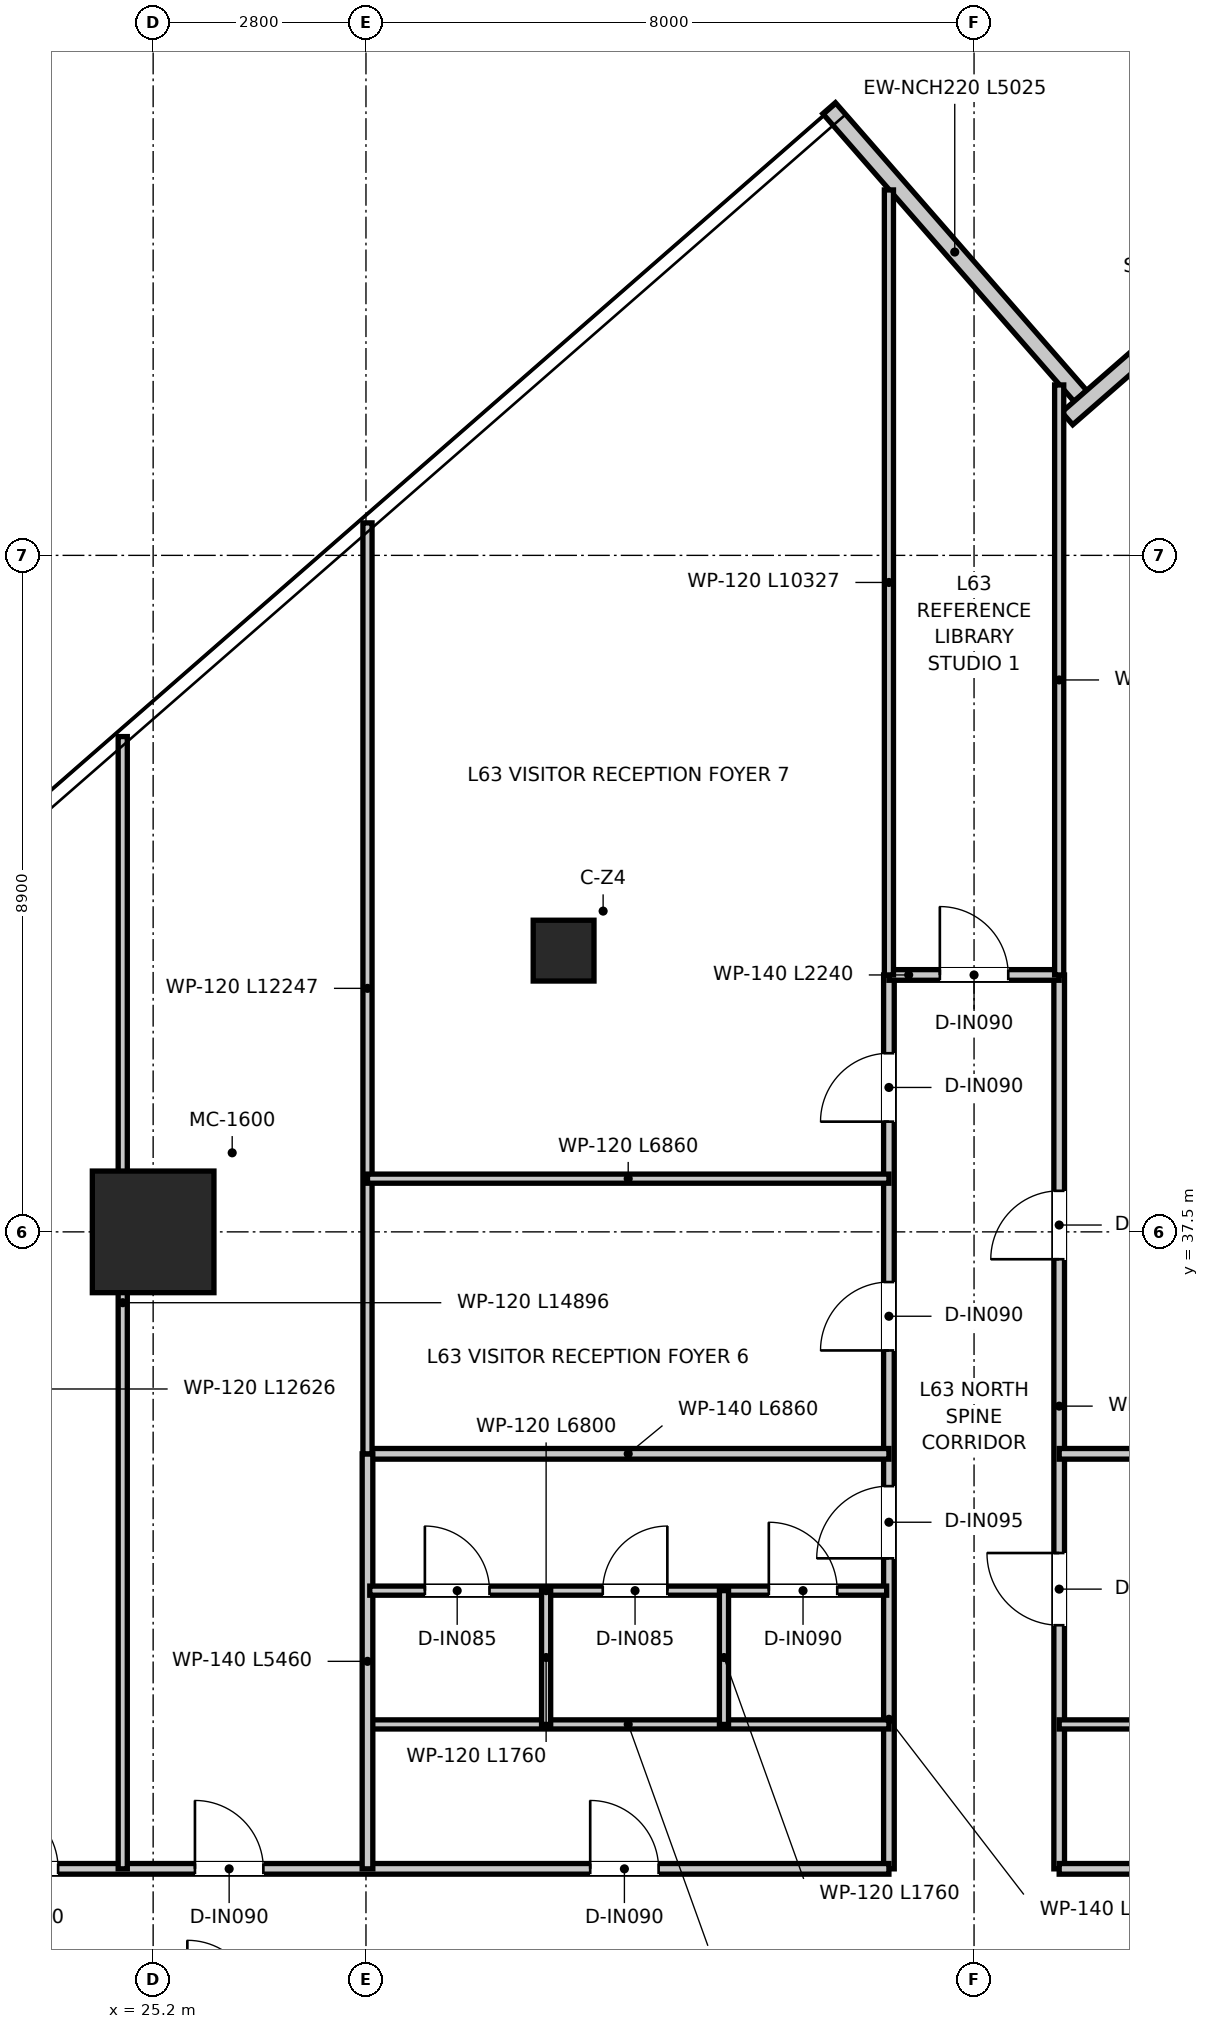
"""IFC4 building model, lengths in metres.
Left out: names, types, materials, properties, quantities, classifications, styles, units other than length and angle.
Written with IfcOpenShell. Run it as: python <this file> out.ifc"""

import sys

from ifc_helpers import new_model, si_unit, direction, frame, frame_2d, origin, origin_2d, place, context, subcontext, project, spatial, rectangle, extrude, source, transform, mapped, element, fill, save


model = new_model("IFC4")
c1 = context("Model", 3, precision=1e-05, world=origin(), true_north=direction((0.0, 1.0)))
c2 = subcontext(c1, "Body", "Model", "MODEL_VIEW")
j1 = project(units=[si_unit("LENGTHUNIT", "METRE"), si_unit("PLANEANGLEUNIT", "RADIAN")], contexts=[c1])
p1 = place(None, origin())
s1 = spatial("IfcSite", under=j1, at=p1, CompositionType="ELEMENT")
p2 = place(p1, origin())
s2 = spatial("IfcBuilding", under=s1, at=p2, CompositionType="ELEMENT")
p3 = place(p2, frame((0.0, 0.0, 258.65)))
s3 = spatial("IfcBuildingStorey", under=s2, at=p3, CompositionType="ELEMENT", Elevation=258.65)
m1 = source(origin(), c2, "Body", "SweptSolid", [
    extrude(rectangle(XDim=1.6, YDim=1.6, at=origin_2d()), origin(), (0.0, 0.0, 1.0), 3.95),
])
p4 = place(p3, frame((25.2, 37.5, 0.0), z_axis=(0.0, 0.0, 1.0), x_axis=(1.0, 0.0, 0.0)))
e1 = element("IfcColumn", 1, at=p4, inside=s3, PredefinedType="USERDEFINED", context=c2, shape_type="MappedRepresentation", body=[
    mapped(m1, transform((0.0, 0.0, 0.0), x_axis=(1.0, 0.0, 0.0), y_axis=(0.0, 1.0, 0.0), z_axis=(0.0, 0.0, 1.0), scale=1.0)),
])
m2 = source(origin(), c2, "Body", "SweptSolid", [
    extrude(rectangle(XDim=0.8, YDim=0.8, at=origin_2d()), origin(), (0.0, 0.0, 1.0), 3.95),
])
p5 = place(p3, frame((30.6, 41.2, 0.0), z_axis=(0.0, 0.0, 1.0), x_axis=(1.0, 0.0, 0.0)))
e2 = element("IfcColumn", 2, at=p5, inside=s3, PredefinedType="COLUMN", context=c2, shape_type="MappedRepresentation", body=[
    mapped(m2, transform((0.0, 0.0, 0.0), x_axis=(1.0, 0.0, 0.0), y_axis=(0.0, 1.0, 0.0), z_axis=(0.0, 0.0, 1.0), scale=1.0)),
])
p6 = place(p3, frame((37.398, 48.498, 0.0), z_axis=(0.0, 0.0, 1.0), x_axis=(-0.657706226339, 0.753274531518, 0.0)))
e3 = element("IfcWall", 3, at=p6, inside=s3, PredefinedType="ELEMENTEDWALL", context=c2, shape_type="SweptSolid", body=[
    extrude(rectangle(XDim=5.025, YDim=0.22, at=frame_2d((2.512, 0.0))), origin(), (0.0, 0.0, 1.0), 3.6),
])
p7 = place(p3, frame((41.339, 51.792, 0.0), z_axis=(0.0, 0.0, 1.0), x_axis=(-0.753268767402, -0.657712827955, 0.0)))
e4 = element("IfcWall", 4, at=p7, inside=s3, PredefinedType="ELEMENTEDWALL", context=c2, shape_type="SweptSolid", body=[
    extrude(rectangle(XDim=5.46, YDim=0.22, at=frame_2d((2.73, 0.0))), origin(), (0.0, 0.0, 1.0), 3.6),
])
p8 = place(p3, frame((34.88, 29.12, 0.0), z_axis=(0.0, 0.0, 1.0), x_axis=(0.0, 1.0, 0.0)))
e5 = element("IfcWall", 5, at=p8, inside=s3, PredefinedType="PARTITIONING", context=c2, shape_type="SweptSolid", body=[
    extrude(rectangle(XDim=11.76, YDim=0.14, at=frame_2d((5.88, 0.0))), origin(), (0.0, 0.0, 1.0), 2.96),
])
p9 = place(p8, frame((4.085, 0.0, 0.0)))
e6 = element("IfcOpeningElement", 6, at=p9, cuts=e5, PredefinedType="OPENING", context=c2, shape_type="SweptSolid", body=[
    extrude(rectangle(XDim=0.95, YDim=2.1, at=frame_2d((0.475, 1.05))), frame((0.0, 0.08, 0.0), z_axis=(0.0, -1.0, 0.0), x_axis=(1.0, 0.0, 0.0)), (0.0, 0.0, 1.0), 0.16),
])
p10 = place(p8, frame((6.82, 0.0, 0.0)))
e7 = element("IfcOpeningElement", 7, at=p10, cuts=e5, PredefinedType="OPENING", context=c2, shape_type="SweptSolid", body=[
    extrude(rectangle(XDim=0.9, YDim=2.1, at=frame_2d((0.45, 1.05))), frame((0.0, 0.08, 0.0), z_axis=(0.0, -1.0, 0.0), x_axis=(1.0, 0.0, 0.0)), (0.0, 0.0, 1.0), 0.16),
])
p11 = place(p8, frame((9.83, 0.0, 0.0)))
e8 = element("IfcOpeningElement", 8, at=p11, cuts=e5, PredefinedType="OPENING", context=c2, shape_type="SweptSolid", body=[
    extrude(rectangle(XDim=0.9, YDim=2.1, at=frame_2d((0.45, 1.05))), frame((0.0, 0.08, 0.0), z_axis=(0.0, -1.0, 0.0), x_axis=(1.0, 0.0, 0.0)), (0.0, 0.0, 1.0), 0.16),
])
p12 = place(p3, frame((37.12, 29.12, 0.0), z_axis=(0.0, 0.0, 1.0), x_axis=(0.0, 1.0, 0.0)))
e9 = element("IfcWall", 9, at=p12, inside=s3, PredefinedType="PARTITIONING", context=c2, shape_type="SweptSolid", body=[
    extrude(rectangle(XDim=11.76, YDim=0.14, at=frame_2d((5.88, 0.0))), origin(), (0.0, 0.0, 1.0), 2.96),
])
p13 = place(p12, frame((3.205, 0.0, 0.0)))
e10 = element("IfcOpeningElement", 10, at=p13, cuts=e9, PredefinedType="OPENING", context=c2, shape_type="SweptSolid", body=[
    extrude(rectangle(XDim=0.95, YDim=2.1, at=frame_2d((0.475, 1.05))), frame((0.0, 0.08, 0.0), z_axis=(0.0, -1.0, 0.0), x_axis=(1.0, 0.0, 0.0)), (0.0, 0.0, 1.0), 0.16),
])
p14 = place(p12, frame((8.02, 0.0, 0.0)))
e11 = element("IfcOpeningElement", 11, at=p14, cuts=e9, PredefinedType="OPENING", context=c2, shape_type="SweptSolid", body=[
    extrude(rectangle(XDim=0.9, YDim=2.1, at=frame_2d((0.45, 1.05))), frame((0.0, 0.08, 0.0), z_axis=(0.0, -1.0, 0.0), x_axis=(1.0, 0.0, 0.0)), (0.0, 0.0, 1.0), 0.16),
])
p15 = place(p3, frame((34.88, 40.88, 0.0), z_axis=(0.0, 0.0, 1.0), x_axis=(1.0, 0.0, 0.0)))
e12 = element("IfcWall", 12, at=p15, inside=s3, PredefinedType="PARTITIONING", context=c2, shape_type="SweptSolid", body=[
    extrude(rectangle(XDim=2.24, YDim=0.14, at=frame_2d((1.12, 0.0))), origin(), (0.0, 0.0, 1.0), 3.6),
])
p16 = place(p15, frame((0.67, 0.0, 0.0)))
e13 = element("IfcOpeningElement", 13, at=p16, cuts=e12, PredefinedType="OPENING", context=c2, shape_type="SweptSolid", body=[
    extrude(rectangle(XDim=0.9, YDim=2.1, at=frame_2d((0.45, 1.05))), frame((0.0, 0.08, 0.0), z_axis=(0.0, -1.0, 0.0), x_axis=(1.0, 0.0, 0.0)), (0.0, 0.0, 1.0), 0.16),
])
p17 = place(p3, frame((13.609, 29.12, 0.0), z_axis=(0.0, 0.0, 1.0), x_axis=(1.0, 0.0, 0.0)))
e14 = element("IfcWall", 14, at=p17, inside=s3, PredefinedType="PARTITIONING", context=c2, shape_type="SweptSolid", body=[
    extrude(rectangle(XDim=21.271, YDim=0.14, at=frame_2d((10.635, 0.0))), origin(), (0.0, 0.0, 1.0), 2.96),
])
p18 = place(p17, frame((17.341, 0.0, 0.0)))
e15 = element("IfcOpeningElement", 15, at=p18, cuts=e14, PredefinedType="OPENING", context=c2, shape_type="SweptSolid", body=[
    extrude(rectangle(XDim=0.9, YDim=2.1, at=frame_2d((0.45, 1.05))), frame((0.0, 0.08, 0.0), z_axis=(0.0, -1.0, 0.0), x_axis=(1.0, 0.0, 0.0)), (0.0, 0.0, 1.0), 0.16),
])
p19 = place(p17, frame((1.478, 0.0, 0.0)))
e16 = element("IfcOpeningElement", 16, at=p19, cuts=e14, PredefinedType="OPENING", context=c2, shape_type="SweptSolid", body=[
    extrude(rectangle(XDim=0.9, YDim=2.1, at=frame_2d((0.45, 1.05))), frame((0.0, 0.08, 0.0), z_axis=(0.0, -1.0, 0.0), x_axis=(1.0, 0.0, 0.0)), (0.0, 0.0, 1.0), 0.16),
])
p20 = place(p17, frame((6.841, 0.0, 0.0)))
e17 = element("IfcOpeningElement", 17, at=p20, cuts=e14, PredefinedType="OPENING", context=c2, shape_type="SweptSolid", body=[
    extrude(rectangle(XDim=0.9, YDim=2.1, at=frame_2d((0.45, 1.05))), frame((0.0, 0.08, 0.0), z_axis=(0.0, -1.0, 0.0), x_axis=(1.0, 0.0, 0.0)), (0.0, 0.0, 1.0), 0.16),
])
p21 = place(p17, frame((9.441, 0.0, 0.0)))
e18 = element("IfcOpeningElement", 18, at=p21, cuts=e14, PredefinedType="OPENING", context=c2, shape_type="SweptSolid", body=[
    extrude(rectangle(XDim=0.9, YDim=2.1, at=frame_2d((0.45, 1.05))), frame((0.0, 0.08, 0.0), z_axis=(0.0, -1.0, 0.0), x_axis=(1.0, 0.0, 0.0)), (0.0, 0.0, 1.0), 0.16),
])
p22 = place(p17, frame((12.141, 0.0, 0.0)))
e19 = element("IfcOpeningElement", 19, at=p22, cuts=e14, PredefinedType="OPENING", context=c2, shape_type="SweptSolid", body=[
    extrude(rectangle(XDim=0.9, YDim=2.1, at=frame_2d((0.45, 1.05))), frame((0.0, 0.08, 0.0), z_axis=(0.0, -1.0, 0.0), x_axis=(1.0, 0.0, 0.0)), (0.0, 0.0, 1.0), 0.16),
])
p23 = place(p3, frame((37.12, 29.12, 0.0), z_axis=(0.0, 0.0, 1.0), x_axis=(1.0, 0.0, 0.0)))
e20 = element("IfcWall", 20, at=p23, inside=s3, PredefinedType="PARTITIONING", context=c2, shape_type="SweptSolid", body=[
    extrude(rectangle(XDim=23.862, YDim=0.14, at=frame_2d((11.931, 0.0))), origin(), (0.0, 0.0, 1.0), 2.96),
])
p24 = place(p23, frame((3.03, 0.0, 0.0)))
e21 = element("IfcOpeningElement", 21, at=p24, cuts=e20, PredefinedType="OPENING", context=c2, shape_type="SweptSolid", body=[
    extrude(rectangle(XDim=0.9, YDim=2.1, at=frame_2d((0.45, 1.05))), frame((0.0, 0.08, 0.0), z_axis=(0.0, -1.0, 0.0), x_axis=(1.0, 0.0, 0.0)), (0.0, 0.0, 1.0), 0.16),
])
p25 = place(p23, frame((8.42, 0.0, 0.0)))
e22 = element("IfcOpeningElement", 22, at=p25, cuts=e20, PredefinedType="OPENING", context=c2, shape_type="SweptSolid", body=[
    extrude(rectangle(XDim=0.9, YDim=2.1, at=frame_2d((0.45, 1.05))), frame((0.0, 0.08, 0.0), z_axis=(0.0, -1.0, 0.0), x_axis=(1.0, 0.0, 0.0)), (0.0, 0.0, 1.0), 0.16),
])
p26 = place(p23, frame((12.03, 0.0, 0.0)))
e23 = element("IfcOpeningElement", 23, at=p26, cuts=e20, PredefinedType="OPENING", context=c2, shape_type="SweptSolid", body=[
    extrude(rectangle(XDim=0.9, YDim=2.1, at=frame_2d((0.45, 1.05))), frame((0.0, 0.08, 0.0), z_axis=(0.0, -1.0, 0.0), x_axis=(1.0, 0.0, 0.0)), (0.0, 0.0, 1.0), 0.16),
])
p27 = place(p23, frame((18.293, 0.0, 0.0)))
e24 = element("IfcOpeningElement", 24, at=p27, cuts=e20, PredefinedType="OPENING", context=c2, shape_type="SweptSolid", body=[
    extrude(rectangle(XDim=0.9, YDim=2.1, at=frame_2d((0.45, 1.05))), frame((0.0, 0.08, 0.0), z_axis=(0.0, -1.0, 0.0), x_axis=(1.0, 0.0, 0.0)), (0.0, 0.0, 1.0), 0.16),
])
for number, where, z_axis, x_axis in (
    (25, (28.02, 31.02, 0.0), (0.0, 0.0, 1.0), (1.0, 0.0, 0.0)),
    (26, (37.12, 31.02, 0.0), (0.0, 0.0, 1.0), (1.0, 0.0, 0.0)),
):
    element("IfcWall", number, at=place(p3, frame(where, z_axis=z_axis, x_axis=x_axis)), inside=s3, PredefinedType="PARTITIONING", context=c2, shape_type="SweptSolid", body=[
        extrude(rectangle(XDim=6.86, YDim=0.12, at=frame_2d((3.43, 0.0))), origin(), (0.0, 0.0, 1.0), 3.11),
    ])
for number, where, z_axis, x_axis in (
    (27, (28.02, 34.58, 0.0), (0.0, 0.0, 1.0), (1.0, 0.0, 0.0)),
    (28, (37.12, 34.58, 0.0), (0.0, 0.0, 1.0), (1.0, 0.0, 0.0)),
):
    element("IfcWall", number, at=place(p3, frame(where, z_axis=z_axis, x_axis=x_axis)), inside=s3, PredefinedType="PARTITIONING", context=c2, shape_type="SweptSolid", body=[
        extrude(rectangle(XDim=6.86, YDim=0.14, at=frame_2d((3.43, 0.0))), origin(), (0.0, 0.0, 1.0), 3.11),
    ])
p28 = place(p3, frame((28.02, 29.12, 0.0), z_axis=(0.0, 0.0, 1.0), x_axis=(0.0, 1.0, 0.0)))
e29 = element("IfcWall", 29, at=p28, inside=s3, PredefinedType="PARTITIONING", context=c2, shape_type="SweptSolid", body=[
    extrude(rectangle(XDim=5.46, YDim=0.14, at=frame_2d((2.73, 0.0))), origin(), (0.0, 0.0, 1.0), 3.3),
])
p29 = place(p3, frame((28.05, 32.78, 0.0), z_axis=(0.0, 0.0, 1.0), x_axis=(1.0, 0.0, 0.0)))
e30 = element("IfcWall", 30, at=p29, inside=s3, PredefinedType="PARTITIONING", context=c2, shape_type="SweptSolid", body=[
    extrude(rectangle(XDim=6.8, YDim=0.12, at=frame_2d((3.4, 0.0))), origin(), (0.0, 0.0, 1.0), 3.11),
])
p30 = place(p29, frame((0.725, 0.0, 0.0)))
e31 = element("IfcOpeningElement", 31, at=p30, cuts=e30, PredefinedType="OPENING", context=c2, shape_type="SweptSolid", body=[
    extrude(rectangle(XDim=0.85, YDim=2.1, at=frame_2d((0.425, 1.05))), frame((0.0, 0.07, 0.0), z_axis=(0.0, -1.0, 0.0), x_axis=(1.0, 0.0, 0.0)), (0.0, 0.0, 1.0), 0.14),
])
p31 = place(p29, frame((3.065, 0.0, 0.0)))
e32 = element("IfcOpeningElement", 32, at=p31, cuts=e30, PredefinedType="OPENING", context=c2, shape_type="SweptSolid", body=[
    extrude(rectangle(XDim=0.85, YDim=2.1, at=frame_2d((0.425, 1.05))), frame((0.0, 0.07, 0.0), z_axis=(0.0, -1.0, 0.0), x_axis=(1.0, 0.0, 0.0)), (0.0, 0.0, 1.0), 0.14),
])
p32 = place(p29, frame((5.25, 0.0, 0.0)))
e33 = element("IfcOpeningElement", 33, at=p32, cuts=e30, PredefinedType="OPENING", context=c2, shape_type="SweptSolid", body=[
    extrude(rectangle(XDim=0.9, YDim=2.1, at=frame_2d((0.45, 1.05))), frame((0.0, 0.07, 0.0), z_axis=(0.0, -1.0, 0.0), x_axis=(1.0, 0.0, 0.0)), (0.0, 0.0, 1.0), 0.14),
])
p33 = place(p3, frame((30.37, 31.02, 0.0), z_axis=(0.0, 0.0, 1.0), x_axis=(0.0, 1.0, 0.0)))
e34 = element("IfcWall", 34, at=p33, inside=s3, PredefinedType="PARTITIONING", context=c2, shape_type="SweptSolid", body=[
    extrude(rectangle(XDim=1.76, YDim=0.12, at=frame_2d((0.88, 0.0))), origin(), (0.0, 0.0, 1.0), 3.11),
])
p34 = place(p3, frame((32.71, 31.02, 0.0), z_axis=(0.0, 0.0, 1.0), x_axis=(0.0, 1.0, 0.0)))
e35 = element("IfcWall", 35, at=p34, inside=s3, PredefinedType="PARTITIONING", context=c2, shape_type="SweptSolid", body=[
    extrude(rectangle(XDim=1.76, YDim=0.12, at=frame_2d((0.88, 0.0))), origin(), (0.0, 0.0, 1.0), 3.6),
])
p35 = place(p3, frame((34.88, 40.88, 0.0), z_axis=(0.0, 0.0, 1.0), x_axis=(0.0, 1.0, 0.0)))
e36 = element("IfcWall", 36, at=p35, inside=s3, PredefinedType="PARTITIONING", context=c2, shape_type="SweptSolid", body=[
    extrude(rectangle(XDim=10.328, YDim=0.12, at=frame_2d((5.164, 0.0))), origin(), (0.0, 0.0, 1.0), 3.21),
])
p36 = place(p3, frame((37.12, 40.88, 0.0), z_axis=(0.0, 0.0, 1.0), x_axis=(0.0, 1.0, 0.0)))
e37 = element("IfcWall", 37, at=p36, inside=s3, PredefinedType="PARTITIONING", context=c2, shape_type="SweptSolid", body=[
    extrude(rectangle(XDim=7.762, YDim=0.12, at=frame_2d((3.881, 0.0))), origin(), (0.0, 0.0, 1.0), 3.21),
])
p37 = place(p3, frame((24.8, 29.12, 0.0), z_axis=(0.0, 0.0, 1.0), x_axis=(0.0, 1.0, 0.0)))
e38 = element("IfcWall", 38, at=p37, inside=s3, PredefinedType="PARTITIONING", context=c2, shape_type="SweptSolid", body=[
    extrude(rectangle(XDim=14.896, YDim=0.12, at=frame_2d((7.448, 0.0))), origin(), (0.0, 0.0, 1.0), 3.11),
])
p38 = place(p3, frame((28.02, 34.58, 0.0), z_axis=(0.0, 0.0, 1.0), x_axis=(0.0, 1.0, 0.0)))
e39 = element("IfcWall", 39, at=p38, inside=s3, PredefinedType="PARTITIONING", context=c2, shape_type="SweptSolid", body=[
    extrude(rectangle(XDim=12.247, YDim=0.12, at=frame_2d((6.124, 0.0))), origin(), (0.0, 0.0, 1.0), 2.96),
])
p39 = place(p3, frame((28.02, 38.2, 0.0), z_axis=(0.0, 0.0, 1.0), x_axis=(1.0, 0.0, 0.0)))
e40 = element("IfcWall", 40, at=p39, inside=s3, PredefinedType="PARTITIONING", context=c2, shape_type="SweptSolid", body=[
    extrude(rectangle(XDim=6.86, YDim=0.12, at=frame_2d((3.43, 0.0))), origin(), (0.0, 0.0, 1.0), 3.11),
])
p40 = place(p18, origin())
e41 = element("IfcDoor", 41, at=p40, inside=s3, OperationType="SINGLE_SWING_LEFT", PredefinedType="DOOR", context=c2, shape_type="SweptSolid", body=[
    extrude(rectangle(XDim=0.9, YDim=2.1, at=frame_2d((0.45, 1.05))), frame((0.0, 0.025, 0.0), z_axis=(0.0, -1.0, 0.0), x_axis=(1.0, 0.0, 0.0)), (0.0, 0.0, 1.0), 0.05),
])
fill(e15, e41)
p41 = place(p9, origin())
e42 = element("IfcDoor", 42, at=p41, inside=s3, OperationType="SINGLE_SWING_LEFT", PredefinedType="DOOR", context=c2, shape_type="SweptSolid", body=[
    extrude(rectangle(XDim=0.95, YDim=2.1, at=frame_2d((0.475, 1.05))), frame((0.0, 0.025, 0.0), z_axis=(0.0, -1.0, 0.0), x_axis=(1.0, 0.0, 0.0)), (0.0, 0.0, 1.0), 0.05),
])
fill(e6, e42)
p42 = place(p13, origin())
e43 = element("IfcDoor", 43, at=p42, inside=s3, OperationType="SINGLE_SWING_RIGHT", PredefinedType="DOOR", context=c2, shape_type="SweptSolid", body=[
    extrude(rectangle(XDim=0.95, YDim=2.1, at=frame_2d((0.475, 1.05))), frame((0.0, 0.025, 0.0), z_axis=(0.0, -1.0, 0.0), x_axis=(1.0, 0.0, 0.0)), (0.0, 0.0, 1.0), 0.05),
])
fill(e10, e43)
p43 = place(p30, origin())
e44 = element("IfcDoor", 44, at=p43, inside=s3, OperationType="SINGLE_SWING_LEFT", PredefinedType="DOOR", context=c2, shape_type="SweptSolid", body=[
    extrude(rectangle(XDim=0.85, YDim=2.1, at=frame_2d((0.425, 1.05))), frame((0.0, 0.025, 0.0), z_axis=(0.0, -1.0, 0.0), x_axis=(1.0, 0.0, 0.0)), (0.0, 0.0, 1.0), 0.05),
])
fill(e31, e44)
p44 = place(p31, origin())
e45 = element("IfcDoor", 45, at=p44, inside=s3, OperationType="SINGLE_SWING_RIGHT", PredefinedType="DOOR", context=c2, shape_type="SweptSolid", body=[
    extrude(rectangle(XDim=0.85, YDim=2.1, at=frame_2d((0.425, 1.05))), frame((0.0, 0.025, 0.0), z_axis=(0.0, -1.0, 0.0), x_axis=(1.0, 0.0, 0.0)), (0.0, 0.0, 1.0), 0.05),
])
fill(e32, e45)
p45 = place(p32, origin())
e46 = element("IfcDoor", 46, at=p45, inside=s3, OperationType="SINGLE_SWING_LEFT", PredefinedType="DOOR", context=c2, shape_type="SweptSolid", body=[
    extrude(rectangle(XDim=0.9, YDim=2.1, at=frame_2d((0.45, 1.05))), frame((0.0, 0.025, 0.0), z_axis=(0.0, -1.0, 0.0), x_axis=(1.0, 0.0, 0.0)), (0.0, 0.0, 1.0), 0.05),
])
fill(e33, e46)
p46 = place(p16, origin())
e47 = element("IfcDoor", 47, at=p46, inside=s3, OperationType="SINGLE_SWING_LEFT", PredefinedType="DOOR", context=c2, shape_type="SweptSolid", body=[
    extrude(rectangle(XDim=0.9, YDim=2.1, at=frame_2d((0.45, 1.05))), frame((0.0, 0.025, 0.0), z_axis=(0.0, -1.0, 0.0), x_axis=(1.0, 0.0, 0.0)), (0.0, 0.0, 1.0), 0.05),
])
fill(e13, e47)
p47 = place(p21, origin())
e48 = element("IfcDoor", 48, at=p47, inside=s3, OperationType="SINGLE_SWING_LEFT", PredefinedType="DOOR", context=c2, shape_type="SweptSolid", body=[
    extrude(rectangle(XDim=0.9, YDim=2.1, at=frame_2d((0.45, 1.05))), frame((0.0, 0.025, 0.0), z_axis=(0.0, -1.0, 0.0), x_axis=(1.0, 0.0, 0.0)), (0.0, 0.0, 1.0), 0.05),
])
fill(e18, e48)
p48 = place(p22, origin())
e49 = element("IfcDoor", 49, at=p48, inside=s3, OperationType="SINGLE_SWING_LEFT", PredefinedType="DOOR", context=c2, shape_type="SweptSolid", body=[
    extrude(rectangle(XDim=0.9, YDim=2.1, at=frame_2d((0.45, 1.05))), frame((0.0, 0.025, 0.0), z_axis=(0.0, -1.0, 0.0), x_axis=(1.0, 0.0, 0.0)), (0.0, 0.0, 1.0), 0.05),
])
fill(e19, e49)
p49 = place(p10, origin())
e50 = element("IfcDoor", 50, at=p49, inside=s3, OperationType="SINGLE_SWING_LEFT", PredefinedType="DOOR", context=c2, shape_type="SweptSolid", body=[
    extrude(rectangle(XDim=0.9, YDim=2.1, at=frame_2d((0.45, 1.05))), frame((0.0, 0.025, 0.0), z_axis=(0.0, -1.0, 0.0), x_axis=(1.0, 0.0, 0.0)), (0.0, 0.0, 1.0), 0.05),
])
fill(e7, e50)
p50 = place(p11, origin())
e51 = element("IfcDoor", 51, at=p50, inside=s3, OperationType="SINGLE_SWING_LEFT", PredefinedType="DOOR", context=c2, shape_type="SweptSolid", body=[
    extrude(rectangle(XDim=0.9, YDim=2.1, at=frame_2d((0.45, 1.05))), frame((0.0, 0.025, 0.0), z_axis=(0.0, -1.0, 0.0), x_axis=(1.0, 0.0, 0.0)), (0.0, 0.0, 1.0), 0.05),
])
fill(e8, e51)
p51 = place(p14, origin())
e52 = element("IfcDoor", 52, at=p51, inside=s3, OperationType="SINGLE_SWING_LEFT", PredefinedType="DOOR", context=c2, shape_type="SweptSolid", body=[
    extrude(rectangle(XDim=0.9, YDim=2.1, at=frame_2d((0.45, 1.05))), frame((0.0, 0.025, 0.0), z_axis=(0.0, -1.0, 0.0), x_axis=(1.0, 0.0, 0.0)), (0.0, 0.0, 1.0), 0.05),
])
fill(e11, e52)
save(model, sys.argv[1])
